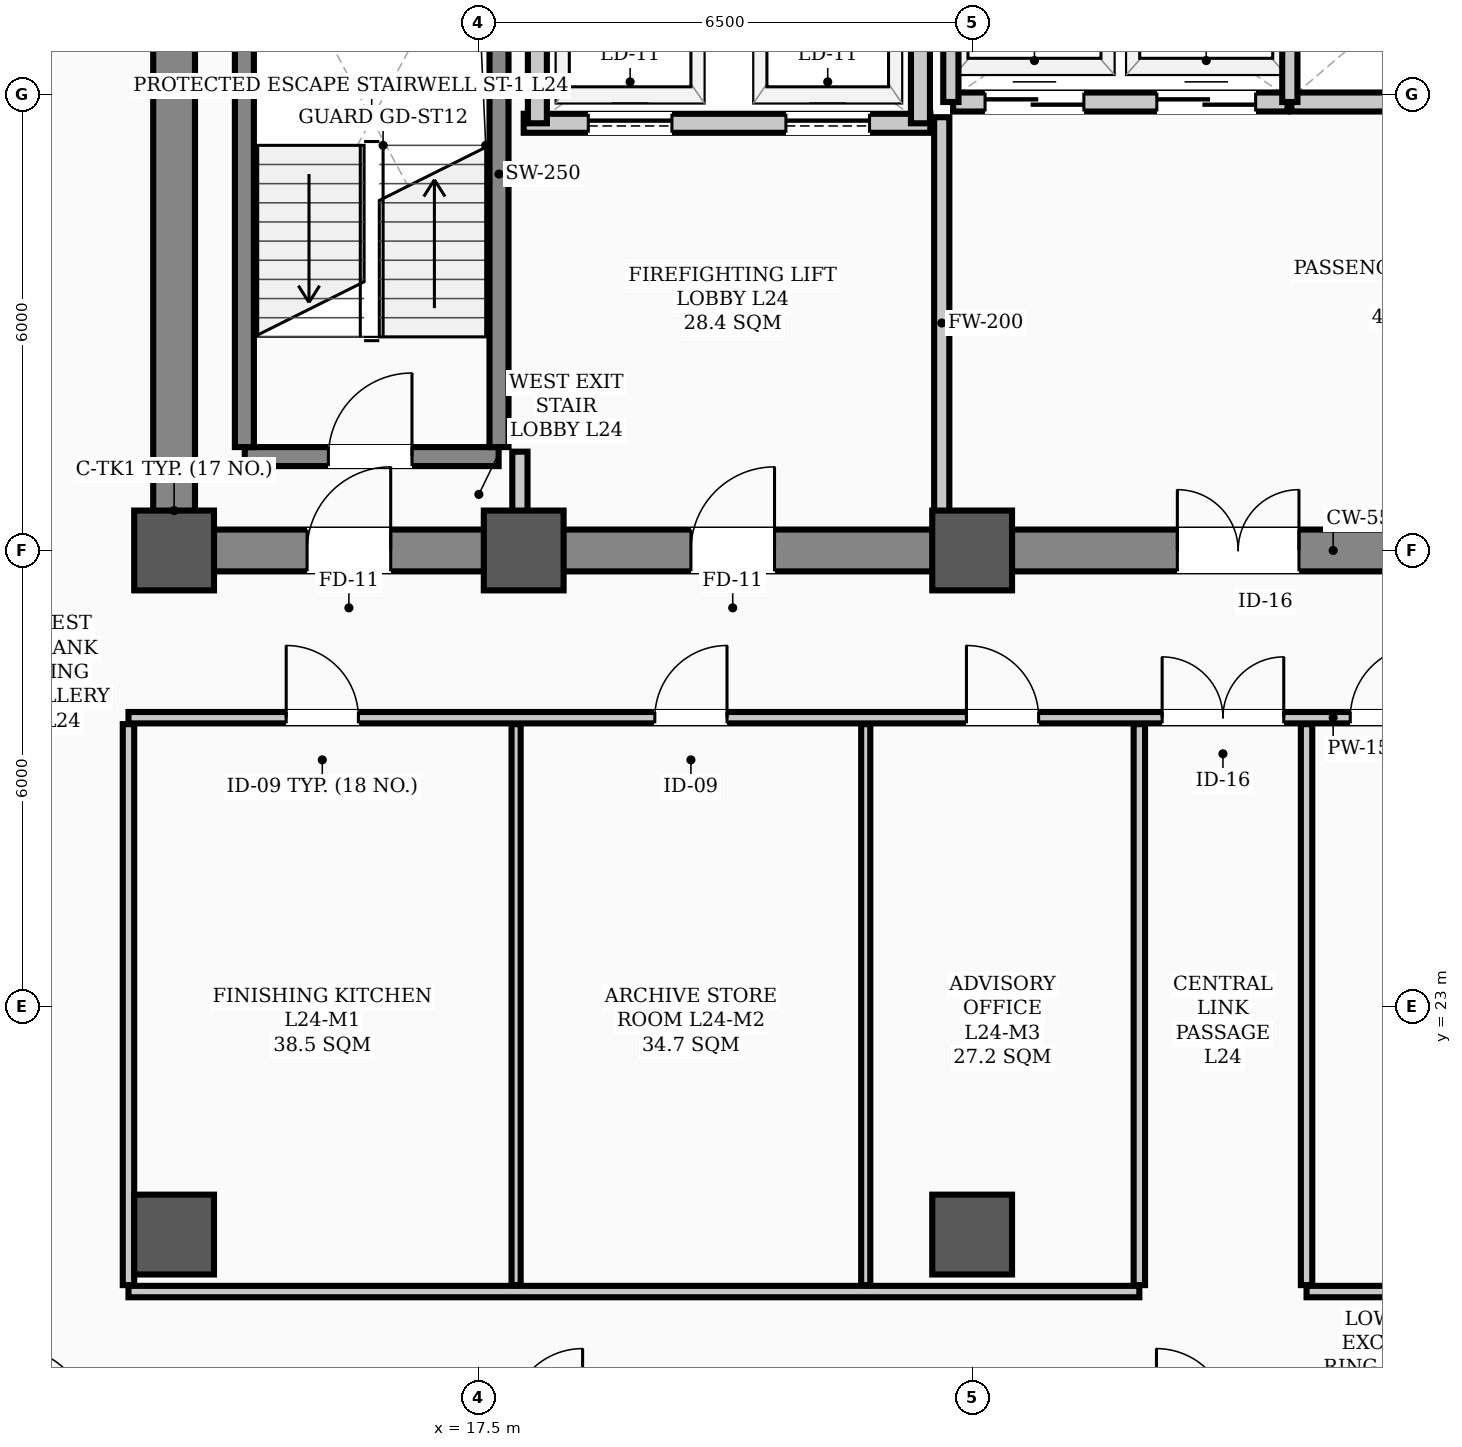
"""IFC4 building model, lengths in metres.
Left out: names, types, materials, properties, quantities, classifications, styles, units other than length and angle.
Written with IfcOpenShell. Run it as: python <this file> out.ifc"""

import sys

from ifc_helpers import new_model, si_unit, direction, frame, frame_2d, origin, origin_2d, place, context, subcontext, project, spatial, rectangle, hollow_rectangle, extrude, element, fill, save


model = new_model("IFC4")
c1 = context("Model", 3, precision=1e-05, world=origin(), true_north=direction((0.0, 1.0)))
c2 = subcontext(c1, "Body", "Model", "MODEL_VIEW")
j1 = project(units=[si_unit("LENGTHUNIT", "METRE"), si_unit("PLANEANGLEUNIT", "RADIAN")], contexts=[c1])
p1 = place(None, origin())
s1 = spatial("IfcSite", under=j1, at=p1, CompositionType="ELEMENT")
p2 = place(p1, origin())
s2 = spatial("IfcBuilding", under=s1, at=p2, CompositionType="ELEMENT")
p3 = place(p2, frame((0.0, 0.0, 96.7)))
s3 = spatial("IfcBuildingStorey", under=s2, at=p3, CompositionType="ELEMENT", Elevation=96.7)
for number, where, z_axis, x_axis in (
    (1, (13.5, 29.0, 0.0), (0.0, 0.0, 1.0), (1.0, 0.0, 0.0)),
    (2, (18.1, 29.0, 0.0), (0.0, 0.0, 1.0), (1.0, 0.0, 0.0)),
    (3, (24.0, 29.0, 0.0), (0.0, 0.0, 1.0), (1.0, 0.0, 0.0)),
    (4, (13.5, 20.0, 0.0), (0.0, 0.0, 1.0), (1.0, 0.0, 0.0)),
    (5, (24.0, 20.0, 0.0), (0.0, 0.0, 1.0), (1.0, 0.0, 0.0)),
):
    element("IfcColumn", number, at=place(p3, frame(where, z_axis=z_axis, x_axis=x_axis)), inside=s3, PredefinedType="COLUMN", context=c2, shape_type="SweptSolid", body=[
        extrude(hollow_rectangle(XDim=1.05, YDim=1.05, WallThickness=0.038, InnerFilletRadius=0.019, OuterFilletRadius=0.057, at=origin_2d()), origin(), (0.0, 0.0, 1.0), 3.9),
    ])
p4 = place(p3, frame((13.5, 29.0, 0.0), z_axis=(0.0, 0.0, 1.0), x_axis=(1.0, 0.0, 0.0)))
e6 = element("IfcWall", 6, at=p4, inside=s3, PredefinedType="SHEAR", context=c2, shape_type="SweptSolid", body=[
    extrude(rectangle(XDim=30.5, YDim=0.55, at=frame_2d((15.25, 0.0))), origin(), (0.0, 0.0, 1.0), 3.6),
])
p5 = place(p4, frame((1.75, 0.0, 0.0)))
e7 = element("IfcOpeningElement", 7, at=p5, cuts=e6, PredefinedType="OPENING", context=c2, shape_type="SweptSolid", body=[
    extrude(rectangle(XDim=1.1, YDim=2.08, at=frame_2d((0.55, 1.04))), frame((0.0, 0.285, 0.0), z_axis=(0.0, -1.0, 0.0), x_axis=(1.0, 0.0, 0.0)), (0.0, 0.0, 1.0), 0.57),
])
p6 = place(p4, frame((26.7, 0.0, 0.0)))
e8 = element("IfcOpeningElement", 8, at=p6, cuts=e6, PredefinedType="OPENING", context=c2, shape_type="SweptSolid", body=[
    extrude(rectangle(XDim=1.1, YDim=2.08, at=frame_2d((0.55, 1.04))), frame((0.0, 0.285, 0.0), z_axis=(0.0, -1.0, 0.0), x_axis=(1.0, 0.0, 0.0)), (0.0, 0.0, 1.0), 0.57),
])
p7 = place(p4, frame((6.8, 0.0, 0.0)))
e9 = element("IfcOpeningElement", 9, at=p7, cuts=e6, PredefinedType="OPENING", context=c2, shape_type="SweptSolid", body=[
    extrude(rectangle(XDim=1.1, YDim=2.08, at=frame_2d((0.55, 1.04))), frame((0.0, 0.285, 0.0), z_axis=(0.0, -1.0, 0.0), x_axis=(1.0, 0.0, 0.0)), (0.0, 0.0, 1.0), 0.57),
])
p8 = place(p4, frame((13.2, 0.0, 0.0)))
e10 = element("IfcOpeningElement", 10, at=p8, cuts=e6, PredefinedType="OPENING", context=c2, shape_type="SweptSolid", body=[
    extrude(rectangle(XDim=1.6, YDim=2.08, at=frame_2d((0.8, 1.04))), frame((0.0, 0.285, 0.0), z_axis=(0.0, -1.0, 0.0), x_axis=(1.0, 0.0, 0.0)), (0.0, 0.0, 1.0), 0.57),
])
p9 = place(p4, frame((19.53, 0.0, 0.0)))
e11 = element("IfcOpeningElement", 11, at=p9, cuts=e6, PredefinedType="OPENING", context=c2, shape_type="SweptSolid", body=[
    extrude(rectangle(XDim=0.9, YDim=2.08, at=frame_2d((0.45, 1.04))), frame((0.0, 0.285, 0.0), z_axis=(0.0, -1.0, 0.0), x_axis=(1.0, 0.0, 0.0)), (0.0, 0.0, 1.0), 0.57),
])
p10 = place(p4, frame((21.57, 0.0, 0.0)))
e12 = element("IfcOpeningElement", 12, at=p10, cuts=e6, PredefinedType="OPENING", context=c2, shape_type="SweptSolid", body=[
    extrude(rectangle(XDim=0.9, YDim=2.08, at=frame_2d((0.45, 1.04))), frame((0.0, 0.285, 0.0), z_axis=(0.0, -1.0, 0.0), x_axis=(1.0, 0.0, 0.0)), (0.0, 0.0, 1.0), 0.57),
])
p11 = place(p3, frame((13.5, 29.35, 0.0), z_axis=(0.0, 0.0, 1.0), x_axis=(0.0, 1.0, 0.0)))
e13 = element("IfcWall", 13, at=p11, inside=s3, PredefinedType="SHEAR", context=c2, shape_type="SweptSolid", body=[
    extrude(rectangle(XDim=8.6, YDim=0.55, at=frame_2d((4.3, 0.0))), origin(), (0.0, 0.0, 1.0), 3.6),
])
p12 = place(p3, frame((14.43, 30.235, 0.0), z_axis=(0.0, 0.0, 1.0), x_axis=(1.0, 0.0, 0.0)))
e14 = element("IfcWall", 14, at=p12, inside=s3, PredefinedType="STANDARD", context=c2, shape_type="SweptSolid", body=[
    extrude(rectangle(XDim=3.34, YDim=0.25, at=frame_2d((1.67, 0.0))), origin(), (0.0, 0.0, 1.0), 3.6),
])
p13 = place(p12, frame((1.1, 0.0, 0.0)))
e15 = element("IfcOpeningElement", 15, at=p13, cuts=e14, PredefinedType="OPENING", context=c2, shape_type="SweptSolid", body=[
    extrude(rectangle(XDim=1.1, YDim=2.08, at=frame_2d((0.55, 1.04))), frame((0.0, 0.135, 0.0), z_axis=(0.0, -1.0, 0.0), x_axis=(1.0, 0.0, 0.0)), (0.0, 0.0, 1.0), 0.27),
])
for number, where, z_axis, x_axis in (
    (16, (14.425, 30.36, 0.0), (0.0, 0.0, 1.0), (0.0, 1.0, 0.0)),
    (17, (17.775, 30.36, 0.0), (0.0, 0.0, 1.0), (0.0, 1.0, 0.0)),
):
    element("IfcWall", number, at=place(p3, frame(where, z_axis=z_axis, x_axis=x_axis)), inside=s3, PredefinedType="STANDARD", context=c2, shape_type="SweptSolid", body=[
        extrude(rectangle(XDim=7.184, YDim=0.25, at=frame_2d((3.592, 0.0))), origin(), (0.0, 0.0, 1.0), 3.6),
    ])
p14 = place(p3, frame((18.1, 34.62, 0.0), z_axis=(0.0, 0.0, 1.0), x_axis=(1.0, 0.0, 0.0)))
e18 = element("IfcWall", 18, at=p14, inside=s3, PredefinedType="STANDARD", context=c2, shape_type="SweptSolid", body=[
    extrude(rectangle(XDim=5.35, YDim=0.25, at=frame_2d((2.675, 0.0))), origin(), (0.0, 0.0, 1.0), 3.6),
])
p15 = place(p14, frame((0.85, 0.0, 0.0)))
e19 = element("IfcOpeningElement", 19, at=p15, cuts=e18, PredefinedType="OPENING", context=c2, shape_type="SweptSolid", body=[
    extrude(rectangle(XDim=1.1, YDim=2.08, at=frame_2d((0.55, 1.04))), frame((0.0, 0.135, 0.0), z_axis=(0.0, -1.0, 0.0), x_axis=(1.0, 0.0, 0.0)), (0.0, 0.0, 1.0), 0.27),
])
p16 = place(p14, frame((3.45, 0.0, 0.0)))
e20 = element("IfcOpeningElement", 20, at=p16, cuts=e18, PredefinedType="OPENING", context=c2, shape_type="SweptSolid", body=[
    extrude(rectangle(XDim=1.1, YDim=2.08, at=frame_2d((0.55, 1.04))), frame((0.0, 0.135, 0.0), z_axis=(0.0, -1.0, 0.0), x_axis=(1.0, 0.0, 0.0)), (0.0, 0.0, 1.0), 0.27),
])
for number, where, z_axis, x_axis in (
    (21, (18.28, 34.62, 0.0), (0.0, 0.0, 1.0), (0.0, 1.0, 0.0)),
    (22, (23.32, 34.62, 0.0), (0.0, 0.0, 1.0), (0.0, 1.0, 0.0)),
):
    element("IfcWall", number, at=place(p3, frame(where, z_axis=z_axis, x_axis=x_axis)), inside=s3, PredefinedType="STANDARD", context=c2, shape_type="SweptSolid", body=[
        extrude(rectangle(XDim=3.33, YDim=0.25, at=frame_2d((1.665, 0.0))), origin(), (0.0, 0.0, 1.0), 2.18),
    ])
p17 = place(p3, frame((23.75, 34.9, 0.0), z_axis=(0.0, 0.0, 1.0), x_axis=(1.0, 0.0, 0.0)))
e23 = element("IfcWall", 23, at=p17, inside=s3, PredefinedType="STANDARD", context=c2, shape_type="SweptSolid", body=[
    extrude(rectangle(XDim=4.4, YDim=0.25, at=frame_2d((2.2, 0.0))), origin(), (0.0, 0.0, 1.0), 3.6),
])
p18 = place(p17, frame((0.42, 0.0, 0.0)))
e24 = element("IfcOpeningElement", 24, at=p18, cuts=e23, PredefinedType="OPENING", context=c2, shape_type="SweptSolid", body=[
    extrude(rectangle(XDim=1.3, YDim=2.08, at=frame_2d((0.65, 1.04))), frame((0.0, 0.135, 0.0), z_axis=(0.0, -1.0, 0.0), x_axis=(1.0, 0.0, 0.0)), (0.0, 0.0, 1.0), 0.27),
])
p19 = place(p17, frame((2.68, 0.0, 0.0)))
e25 = element("IfcOpeningElement", 25, at=p19, cuts=e23, PredefinedType="OPENING", context=c2, shape_type="SweptSolid", body=[
    extrude(rectangle(XDim=1.3, YDim=2.08, at=frame_2d((0.65, 1.04))), frame((0.0, 0.135, 0.0), z_axis=(0.0, -1.0, 0.0), x_axis=(1.0, 0.0, 0.0)), (0.0, 0.0, 1.0), 0.27),
])
p20 = place(p3, frame((28.2, 34.9, 0.0), z_axis=(0.0, 0.0, 1.0), x_axis=(1.0, 0.0, 0.0)))
e26 = element("IfcWall", 26, at=p20, inside=s3, PredefinedType="STANDARD", context=c2, shape_type="SweptSolid", body=[
    extrude(rectangle(XDim=3.55, YDim=0.25, at=frame_2d((1.775, 0.0))), origin(), (0.0, 0.0, 1.0), 3.6),
])
p21 = place(p3, frame((12.9, 26.8, 0.0), z_axis=(0.0, 0.0, 1.0), x_axis=(1.0, 0.0, 0.0)))
e27 = element("IfcWall", 27, at=p21, inside=s3, PredefinedType="PARTITIONING", context=c2, shape_type="SweptSolid", body=[
    extrude(rectangle(XDim=31.7, YDim=0.15, at=frame_2d((15.85, 0.0))), origin(), (0.0, 0.0, 1.0), 2.18),
])
p22 = place(p21, frame((13.6, 0.0, 0.0)))
e28 = element("IfcOpeningElement", 28, at=p22, cuts=e27, PredefinedType="OPENING", context=c2, shape_type="SweptSolid", body=[
    extrude(rectangle(XDim=1.6, YDim=2.08, at=frame_2d((0.8, 1.04))), frame((0.0, 0.085, 0.0), z_axis=(0.0, -1.0, 0.0), x_axis=(1.0, 0.0, 0.0)), (0.0, 0.0, 1.0), 0.17),
])
p23 = place(p21, frame((2.075, 0.0, 0.0)))
e29 = element("IfcOpeningElement", 29, at=p23, cuts=e27, PredefinedType="OPENING", context=c2, shape_type="SweptSolid", body=[
    extrude(rectangle(XDim=0.95, YDim=2.08, at=frame_2d((0.475, 1.04))), frame((0.0, 0.085, 0.0), z_axis=(0.0, -1.0, 0.0), x_axis=(1.0, 0.0, 0.0)), (0.0, 0.0, 1.0), 0.17),
])
p24 = place(p21, frame((6.925, 0.0, 0.0)))
e30 = element("IfcOpeningElement", 30, at=p24, cuts=e27, PredefinedType="OPENING", context=c2, shape_type="SweptSolid", body=[
    extrude(rectangle(XDim=0.95, YDim=2.08, at=frame_2d((0.475, 1.04))), frame((0.0, 0.085, 0.0), z_axis=(0.0, -1.0, 0.0), x_axis=(1.0, 0.0, 0.0)), (0.0, 0.0, 1.0), 0.17),
])
p25 = place(p21, frame((11.025, 0.0, 0.0)))
e31 = element("IfcOpeningElement", 31, at=p25, cuts=e27, PredefinedType="OPENING", context=c2, shape_type="SweptSolid", body=[
    extrude(rectangle(XDim=0.95, YDim=2.08, at=frame_2d((0.475, 1.04))), frame((0.0, 0.085, 0.0), z_axis=(0.0, -1.0, 0.0), x_axis=(1.0, 0.0, 0.0)), (0.0, 0.0, 1.0), 0.17),
])
p26 = place(p21, frame((16.075, 0.0, 0.0)))
e32 = element("IfcOpeningElement", 32, at=p26, cuts=e27, PredefinedType="OPENING", context=c2, shape_type="SweptSolid", body=[
    extrude(rectangle(XDim=0.95, YDim=2.08, at=frame_2d((0.475, 1.04))), frame((0.0, 0.085, 0.0), z_axis=(0.0, -1.0, 0.0), x_axis=(1.0, 0.0, 0.0)), (0.0, 0.0, 1.0), 0.17),
])
p27 = place(p21, frame((22.025, 0.0, 0.0)))
e33 = element("IfcOpeningElement", 33, at=p27, cuts=e27, PredefinedType="OPENING", context=c2, shape_type="SweptSolid", body=[
    extrude(rectangle(XDim=0.95, YDim=2.08, at=frame_2d((0.475, 1.04))), frame((0.0, 0.085, 0.0), z_axis=(0.0, -1.0, 0.0), x_axis=(1.0, 0.0, 0.0)), (0.0, 0.0, 1.0), 0.17),
])
p28 = place(p21, frame((28.525, 0.0, 0.0)))
e34 = element("IfcOpeningElement", 34, at=p28, cuts=e27, PredefinedType="OPENING", context=c2, shape_type="SweptSolid", body=[
    extrude(rectangle(XDim=0.95, YDim=2.08, at=frame_2d((0.475, 1.04))), frame((0.0, 0.085, 0.0), z_axis=(0.0, -1.0, 0.0), x_axis=(1.0, 0.0, 0.0)), (0.0, 0.0, 1.0), 0.17),
])
p29 = place(p3, frame((12.9, 19.25, 0.0), z_axis=(0.0, 0.0, 1.0), x_axis=(1.0, 0.0, 0.0)))
e35 = element("IfcWall", 35, at=p29, inside=s3, PredefinedType="PARTITIONING", context=c2, shape_type="SweptSolid", body=[
    extrude(rectangle(XDim=13.3, YDim=0.15, at=frame_2d((6.65, 0.0))), origin(), (0.0, 0.0, 1.0), 2.18),
])
p30 = place(p3, frame((28.4, 19.25, 0.0), z_axis=(0.0, 0.0, 1.0), x_axis=(1.0, 0.0, 0.0)))
e36 = element("IfcWall", 36, at=p30, inside=s3, PredefinedType="PARTITIONING", context=c2, shape_type="SweptSolid", body=[
    extrude(rectangle(XDim=16.2, YDim=0.15, at=frame_2d((8.1, 0.0))), origin(), (0.0, 0.0, 1.0), 2.18),
])
p31 = place(p3, frame((18.05, 29.285, 0.0), z_axis=(0.0, 0.0, 1.0), x_axis=(0.0, 1.0, 0.0)))
e37 = element("IfcWall", 37, at=p31, inside=s3, PredefinedType="STANDARD", context=c2, shape_type="SweptSolid", body=[
    extrude(rectangle(XDim=1.015, YDim=0.2, at=frame_2d((0.508, 0.0))), origin(), (0.0, 0.0, 1.0), 2.18),
])
p32 = place(p3, frame((23.6, 29.285, 0.0), z_axis=(0.0, 0.0, 1.0), x_axis=(0.0, 1.0, 0.0)))
e38 = element("IfcWall", 38, at=p32, inside=s3, PredefinedType="STANDARD", context=c2, shape_type="SweptSolid", body=[
    extrude(rectangle(XDim=5.415, YDim=0.2, at=frame_2d((2.708, 0.0))), origin(), (0.0, 0.0, 1.0), 2.18),
])
for number, where, z_axis, x_axis in (
    (39, (26.2, 19.335, 0.0), (0.0, 0.0, 1.0), (0.0, 1.0, 0.0)),
    (40, (28.4, 19.335, 0.0), (0.0, 0.0, 1.0), (0.0, 1.0, 0.0)),
    (41, (12.9, 19.335, 0.0), (0.0, 0.0, 1.0), (0.0, 1.0, 0.0)),
):
    element("IfcWall", number, at=place(p3, frame(where, z_axis=z_axis, x_axis=x_axis)), inside=s3, PredefinedType="PARTITIONING", context=c2, shape_type="SweptSolid", body=[
        extrude(rectangle(XDim=7.38, YDim=0.15, at=frame_2d((3.69, 0.0))), origin(), (0.0, 0.0, 1.0), 2.18),
    ])
for number, where, z_axis, x_axis in (
    (42, (18.0, 19.335, 0.0), (0.0, 0.0, 1.0), (0.0, 1.0, 0.0)),
    (43, (22.6, 19.335, 0.0), (0.0, 0.0, 1.0), (0.0, 1.0, 0.0)),
):
    element("IfcWall", number, at=place(p3, frame(where, z_axis=z_axis, x_axis=x_axis)), inside=s3, PredefinedType="PARTITIONING", context=c2, shape_type="SweptSolid", body=[
        extrude(rectangle(XDim=7.38, YDim=0.12, at=frame_2d((3.69, 0.0))), origin(), (0.0, 0.0, 1.0), 2.18),
    ])
for number, where, z_axis, x_axis in (
    (44, (23.72, 34.9, 0.0), (0.0, 0.0, 1.0), (0.0, 1.0, 0.0)),
    (45, (28.18, 34.9, 0.0), (0.0, 0.0, 1.0), (0.0, 1.0, 0.0)),
):
    element("IfcWall", number, at=place(p3, frame(where, z_axis=z_axis, x_axis=x_axis)), inside=s3, PredefinedType="STANDARD", context=c2, shape_type="SweptSolid", body=[
        extrude(rectangle(XDim=3.12, YDim=0.2, at=frame_2d((1.56, 0.0))), origin(), (0.0, 0.0, 1.0), 2.18),
    ])
p33 = place(p13, origin())
e46 = element("IfcDoor", 46, at=p33, inside=s3, OperationType="SINGLE_SWING_RIGHT", PredefinedType="DOOR", context=c2, shape_type="SweptSolid", body=[
    extrude(rectangle(XDim=1.1, YDim=2.08, at=frame_2d((0.55, 1.04))), frame((0.0, 0.025, 0.0), z_axis=(0.0, -1.0, 0.0), x_axis=(1.0, 0.0, 0.0)), (0.0, 0.0, 1.0), 0.05),
])
fill(e15, e46)
p34 = place(p5, origin())
e47 = element("IfcDoor", 47, at=p34, inside=s3, OperationType="SINGLE_SWING_RIGHT", PredefinedType="DOOR", context=c2, shape_type="SweptSolid", body=[
    extrude(rectangle(XDim=1.1, YDim=2.08, at=frame_2d((0.55, 1.04))), frame((0.0, 0.025, 0.0), z_axis=(0.0, -1.0, 0.0), x_axis=(1.0, 0.0, 0.0)), (0.0, 0.0, 1.0), 0.05),
])
fill(e7, e47)
p35 = place(p7, origin())
e48 = element("IfcDoor", 48, at=p35, inside=s3, OperationType="SINGLE_SWING_RIGHT", PredefinedType="DOOR", context=c2, shape_type="SweptSolid", body=[
    extrude(rectangle(XDim=1.1, YDim=2.08, at=frame_2d((0.55, 1.04))), frame((0.0, 0.025, 0.0), z_axis=(0.0, -1.0, 0.0), x_axis=(1.0, 0.0, 0.0)), (0.0, 0.0, 1.0), 0.05),
])
fill(e9, e48)
p36 = place(p8, origin())
e49 = element("IfcDoor", 49, at=p36, inside=s3, OperationType="DOUBLE_DOOR_SINGLE_SWING", PredefinedType="DOOR", context=c2, shape_type="SweptSolid", body=[
    extrude(rectangle(XDim=1.6, YDim=2.08, at=frame_2d((0.8, 1.04))), frame((0.0, 0.025, 0.0), z_axis=(0.0, -1.0, 0.0), x_axis=(1.0, 0.0, 0.0)), (0.0, 0.0, 1.0), 0.05),
])
fill(e10, e49)
p37 = place(p22, origin())
e50 = element("IfcDoor", 50, at=p37, inside=s3, OperationType="DOUBLE_DOOR_SINGLE_SWING", PredefinedType="DOOR", context=c2, shape_type="SweptSolid", body=[
    extrude(rectangle(XDim=1.6, YDim=2.08, at=frame_2d((0.8, 1.04))), frame((0.0, 0.025, 0.0), z_axis=(0.0, -1.0, 0.0), x_axis=(1.0, 0.0, 0.0)), (0.0, 0.0, 1.0), 0.05),
])
fill(e28, e50)
p38 = place(p23, origin())
e51 = element("IfcDoor", 51, at=p38, inside=s3, OperationType="SINGLE_SWING_LEFT", PredefinedType="DOOR", context=c2, shape_type="SweptSolid", body=[
    extrude(rectangle(XDim=0.95, YDim=2.08, at=frame_2d((0.475, 1.04))), frame((0.0, 0.025, 0.0), z_axis=(0.0, -1.0, 0.0), x_axis=(1.0, 0.0, 0.0)), (0.0, 0.0, 1.0), 0.05),
])
fill(e29, e51)
p39 = place(p24, origin())
e52 = element("IfcDoor", 52, at=p39, inside=s3, OperationType="SINGLE_SWING_RIGHT", PredefinedType="DOOR", context=c2, shape_type="SweptSolid", body=[
    extrude(rectangle(XDim=0.95, YDim=2.08, at=frame_2d((0.475, 1.04))), frame((0.0, 0.025, 0.0), z_axis=(0.0, -1.0, 0.0), x_axis=(1.0, 0.0, 0.0)), (0.0, 0.0, 1.0), 0.05),
])
fill(e30, e52)
p40 = place(p25, origin())
e53 = element("IfcDoor", 53, at=p40, inside=s3, OperationType="SINGLE_SWING_LEFT", PredefinedType="DOOR", context=c2, shape_type="SweptSolid", body=[
    extrude(rectangle(XDim=0.95, YDim=2.08, at=frame_2d((0.475, 1.04))), frame((0.0, 0.025, 0.0), z_axis=(0.0, -1.0, 0.0), x_axis=(1.0, 0.0, 0.0)), (0.0, 0.0, 1.0), 0.05),
])
fill(e31, e53)
p41 = place(p26, origin())
e54 = element("IfcDoor", 54, at=p41, inside=s3, OperationType="SINGLE_SWING_RIGHT", PredefinedType="DOOR", context=c2, shape_type="SweptSolid", body=[
    extrude(rectangle(XDim=0.95, YDim=2.08, at=frame_2d((0.475, 1.04))), frame((0.0, 0.025, 0.0), z_axis=(0.0, -1.0, 0.0), x_axis=(1.0, 0.0, 0.0)), (0.0, 0.0, 1.0), 0.05),
])
fill(e32, e54)
p42 = place(p15, origin())
e55 = element("IfcDoor", 55, at=p42, inside=s3, OperationType="SLIDING_TO_LEFT", PredefinedType="DOOR", context=c2, shape_type="SweptSolid", body=[
    extrude(rectangle(XDim=1.1, YDim=2.08, at=frame_2d((0.55, 1.04))), frame((0.0, 0.025, 0.0), z_axis=(0.0, -1.0, 0.0), x_axis=(1.0, 0.0, 0.0)), (0.0, 0.0, 1.0), 0.05),
])
fill(e19, e55)
p43 = place(p16, origin())
e56 = element("IfcDoor", 56, at=p43, inside=s3, OperationType="SLIDING_TO_LEFT", PredefinedType="DOOR", context=c2, shape_type="SweptSolid", body=[
    extrude(rectangle(XDim=1.1, YDim=2.08, at=frame_2d((0.55, 1.04))), frame((0.0, 0.025, 0.0), z_axis=(0.0, -1.0, 0.0), x_axis=(1.0, 0.0, 0.0)), (0.0, 0.0, 1.0), 0.05),
])
fill(e20, e56)
p44 = place(p18, origin())
e57 = element("IfcDoor", 57, at=p44, inside=s3, OperationType="DOUBLE_DOOR_SLIDING", PredefinedType="DOOR", context=c2, shape_type="SweptSolid", body=[
    extrude(rectangle(XDim=1.3, YDim=2.08, at=frame_2d((0.65, 1.04))), frame((0.0, 0.025, 0.0), z_axis=(0.0, -1.0, 0.0), x_axis=(1.0, 0.0, 0.0)), (0.0, 0.0, 1.0), 0.05),
])
fill(e24, e57)
p45 = place(p19, origin())
e58 = element("IfcDoor", 58, at=p45, inside=s3, OperationType="DOUBLE_DOOR_SLIDING", PredefinedType="DOOR", context=c2, shape_type="SweptSolid", body=[
    extrude(rectangle(XDim=1.3, YDim=2.08, at=frame_2d((0.65, 1.04))), frame((0.0, 0.025, 0.0), z_axis=(0.0, -1.0, 0.0), x_axis=(1.0, 0.0, 0.0)), (0.0, 0.0, 1.0), 0.05),
])
fill(e25, e58)
save(model, sys.argv[1])
